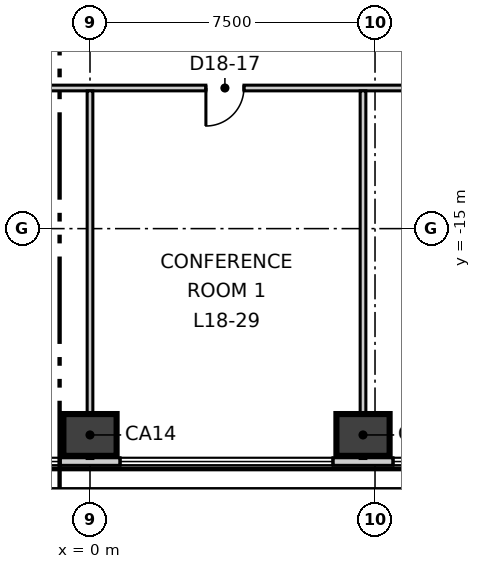
"""IFC4 building model, lengths in metres.
Left out: names, types, materials, properties, quantities, classifications, styles, units other than length and angle.
Written with IfcOpenShell. Run it as: python <this file> out.ifc"""

import sys

from ifc_helpers import new_model, si_unit, direction, frame, frame_2d, origin, origin_2d, place, context, subcontext, project, spatial, rectangle, extrude, element, fill, save


model = new_model("IFC4")
c1 = context("Model", 3, precision=1e-05, world=origin(), true_north=direction((0.0, 1.0)))
c2 = subcontext(c1, "Body", "Model", "MODEL_VIEW")
j1 = project(units=[si_unit("LENGTHUNIT", "METRE"), si_unit("PLANEANGLEUNIT", "RADIAN")], contexts=[c1])
p1 = place(None, origin())
s1 = spatial("IfcSite", under=j1, at=p1, CompositionType="ELEMENT")
p2 = place(p1, origin())
s2 = spatial("IfcBuilding", under=s1, at=p2, CompositionType="ELEMENT")
p3 = place(p2, frame((0.0, 0.0, 83.3)))
s3 = spatial("IfcBuildingStorey", under=s2, at=p3, CompositionType="ELEMENT", Elevation=83.3)
for number, where, z_axis, x_axis in (
    (1, (0.0, -20.429, -0.3), (0.0, 0.0, 1.0), (1.0, 0.0, 0.0)),
    (2, (7.184, -20.429, -0.3), (0.0, 0.0, 1.0), (1.0, 0.0, 0.0)),
):
    element("IfcColumn", number, at=place(p3, frame(where, z_axis=z_axis, x_axis=x_axis)), inside=s3, PredefinedType="COLUMN", context=c2, shape_type="SweptSolid", body=[
        extrude(rectangle(XDim=1.4, YDim=1.1, at=origin_2d()), origin(), (0.0, 0.0, 1.0), 4.0),
    ])
p4 = place(p3, frame((-30.037, -21.129, 0.0), z_axis=(0.0, 0.0, 1.0), x_axis=(1.0, 0.0, 0.0)))
e3 = element("IfcWall", 3, at=p4, inside=s3, PredefinedType="ELEMENTEDWALL", context=c2, shape_type="SweptSolid", body=[
    extrude(rectangle(XDim=60.054, YDim=0.2, at=frame_2d((30.027, 0.0))), origin(), (0.0, 0.0, 1.0), 3.7),
])
p5 = place(p4, frame((2.095, 0.0, 0.9)))
e4 = element("IfcOpeningElement", 4, at=p5, cuts=e3, PredefinedType="OPENING", context=c2, shape_type="SweptSolid", body=[
    extrude(rectangle(XDim=5.6, YDim=2.5, at=frame_2d((2.8, 1.25))), frame((0.0, 0.11, 0.0), z_axis=(0.0, -1.0, 0.0), x_axis=(1.0, 0.0, 0.0)), (0.0, 0.0, 1.0), 0.22),
])
p6 = place(p4, frame((9.278, 0.0, 0.9)))
e5 = element("IfcOpeningElement", 5, at=p6, cuts=e3, PredefinedType="OPENING", context=c2, shape_type="SweptSolid", body=[
    extrude(rectangle(XDim=5.6, YDim=2.5, at=frame_2d((2.8, 1.25))), frame((0.0, 0.11, 0.0), z_axis=(0.0, -1.0, 0.0), x_axis=(1.0, 0.0, 0.0)), (0.0, 0.0, 1.0), 0.22),
])
p7 = place(p4, frame((16.462, 0.0, 0.9)))
e6 = element("IfcOpeningElement", 6, at=p7, cuts=e3, PredefinedType="OPENING", context=c2, shape_type="SweptSolid", body=[
    extrude(rectangle(XDim=5.6, YDim=2.5, at=frame_2d((2.8, 1.25))), frame((0.0, 0.11, 0.0), z_axis=(0.0, -1.0, 0.0), x_axis=(1.0, 0.0, 0.0)), (0.0, 0.0, 1.0), 0.22),
])
p8 = place(p4, frame((23.645, 0.0, 0.9)))
e7 = element("IfcOpeningElement", 7, at=p8, cuts=e3, PredefinedType="OPENING", context=c2, shape_type="SweptSolid", body=[
    extrude(rectangle(XDim=5.6, YDim=2.5, at=frame_2d((2.8, 1.25))), frame((0.0, 0.11, 0.0), z_axis=(0.0, -1.0, 0.0), x_axis=(1.0, 0.0, 0.0)), (0.0, 0.0, 1.0), 0.22),
])
p9 = place(p4, frame((30.829, 0.0, 0.9)))
e8 = element("IfcOpeningElement", 8, at=p9, cuts=e3, PredefinedType="OPENING", context=c2, shape_type="SweptSolid", body=[
    extrude(rectangle(XDim=5.6, YDim=2.5, at=frame_2d((2.8, 1.25))), frame((0.0, 0.11, 0.0), z_axis=(0.0, -1.0, 0.0), x_axis=(1.0, 0.0, 0.0)), (0.0, 0.0, 1.0), 0.22),
])
p10 = place(p4, frame((38.012, 0.0, 0.9)))
e9 = element("IfcOpeningElement", 9, at=p10, cuts=e3, PredefinedType="OPENING", context=c2, shape_type="SweptSolid", body=[
    extrude(rectangle(XDim=5.6, YDim=2.5, at=frame_2d((2.8, 1.25))), frame((0.0, 0.11, 0.0), z_axis=(0.0, -1.0, 0.0), x_axis=(1.0, 0.0, 0.0)), (0.0, 0.0, 1.0), 0.22),
])
p11 = place(p4, frame((45.196, 0.0, 0.9)))
e10 = element("IfcOpeningElement", 10, at=p11, cuts=e3, PredefinedType="OPENING", context=c2, shape_type="SweptSolid", body=[
    extrude(rectangle(XDim=5.6, YDim=2.5, at=frame_2d((2.8, 1.25))), frame((0.0, 0.11, 0.0), z_axis=(0.0, -1.0, 0.0), x_axis=(1.0, 0.0, 0.0)), (0.0, 0.0, 1.0), 0.22),
])
p12 = place(p4, frame((52.379, 0.0, 0.9)))
e11 = element("IfcOpeningElement", 11, at=p12, cuts=e3, PredefinedType="OPENING", context=c2, shape_type="SweptSolid", body=[
    extrude(rectangle(XDim=5.6, YDim=2.5, at=frame_2d((2.8, 1.25))), frame((0.0, 0.11, 0.0), z_axis=(0.0, -1.0, 0.0), x_axis=(1.0, 0.0, 0.0)), (0.0, 0.0, 1.0), 0.22),
])
p13 = place(p3, frame((33.317, -15.448, 0.0), z_axis=(0.0, 0.0, 1.0), x_axis=(-0.499999874703, 0.866025476125, 0.0)))
e12 = element("IfcWall", 12, at=p13, inside=s3, PredefinedType="ELEMENTEDWALL", context=c2, shape_type="SweptSolid", body=[
    extrude(rectangle(XDim=60.054, YDim=0.2, at=frame_2d((30.027, 0.0))), origin(), (0.0, 0.0, 1.0), 3.7),
])
p14 = place(p13, frame((2.094, 0.0, 0.9)))
e13 = element("IfcOpeningElement", 13, at=p14, cuts=e12, PredefinedType="OPENING", context=c2, shape_type="SweptSolid", body=[
    extrude(rectangle(XDim=5.6, YDim=2.5, at=frame_2d((2.8, 1.25))), frame((0.0, 0.11, 0.0), z_axis=(0.0, -1.0, 0.0), x_axis=(1.0, 0.0, 0.0)), (0.0, 0.0, 1.0), 0.22),
])
p15 = place(p13, frame((9.278, 0.0, 0.9)))
e14 = element("IfcOpeningElement", 14, at=p15, cuts=e12, PredefinedType="OPENING", context=c2, shape_type="SweptSolid", body=[
    extrude(rectangle(XDim=5.6, YDim=2.5, at=frame_2d((2.8, 1.25))), frame((0.0, 0.11, 0.0), z_axis=(0.0, -1.0, 0.0), x_axis=(1.0, 0.0, 0.0)), (0.0, 0.0, 1.0), 0.22),
])
p16 = place(p13, frame((16.462, 0.0, 0.9)))
e15 = element("IfcOpeningElement", 15, at=p16, cuts=e12, PredefinedType="OPENING", context=c2, shape_type="SweptSolid", body=[
    extrude(rectangle(XDim=5.6, YDim=2.5, at=frame_2d((2.8, 1.25))), frame((0.0, 0.11, 0.0), z_axis=(0.0, -1.0, 0.0), x_axis=(1.0, 0.0, 0.0)), (0.0, 0.0, 1.0), 0.22),
])
p17 = place(p13, frame((23.645, 0.0, 0.9)))
e16 = element("IfcOpeningElement", 16, at=p17, cuts=e12, PredefinedType="OPENING", context=c2, shape_type="SweptSolid", body=[
    extrude(rectangle(XDim=5.6, YDim=2.5, at=frame_2d((2.8, 1.25))), frame((0.0, 0.11, 0.0), z_axis=(0.0, -1.0, 0.0), x_axis=(1.0, 0.0, 0.0)), (0.0, 0.0, 1.0), 0.22),
])
p18 = place(p13, frame((30.829, 0.0, 0.9)))
e17 = element("IfcOpeningElement", 17, at=p18, cuts=e12, PredefinedType="OPENING", context=c2, shape_type="SweptSolid", body=[
    extrude(rectangle(XDim=5.6, YDim=2.5, at=frame_2d((2.8, 1.25))), frame((0.0, 0.11, 0.0), z_axis=(0.0, -1.0, 0.0), x_axis=(1.0, 0.0, 0.0)), (0.0, 0.0, 1.0), 0.22),
])
p19 = place(p13, frame((38.012, 0.0, 0.9)))
e18 = element("IfcOpeningElement", 18, at=p19, cuts=e12, PredefinedType="OPENING", context=c2, shape_type="SweptSolid", body=[
    extrude(rectangle(XDim=5.6, YDim=2.5, at=frame_2d((2.8, 1.25))), frame((0.0, 0.11, 0.0), z_axis=(0.0, -1.0, 0.0), x_axis=(1.0, 0.0, 0.0)), (0.0, 0.0, 1.0), 0.22),
])
p20 = place(p13, frame((45.196, 0.0, 0.9)))
e19 = element("IfcOpeningElement", 19, at=p20, cuts=e12, PredefinedType="OPENING", context=c2, shape_type="SweptSolid", body=[
    extrude(rectangle(XDim=5.6, YDim=2.5, at=frame_2d((2.8, 1.25))), frame((0.0, 0.11, 0.0), z_axis=(0.0, -1.0, 0.0), x_axis=(1.0, 0.0, 0.0)), (0.0, 0.0, 1.0), 0.22),
])
p21 = place(p13, frame((52.379, 0.0, 0.9)))
e20 = element("IfcOpeningElement", 20, at=p21, cuts=e12, PredefinedType="OPENING", context=c2, shape_type="SweptSolid", body=[
    extrude(rectangle(XDim=5.6, YDim=2.5, at=frame_2d((2.8, 1.25))), frame((0.0, 0.11, 0.0), z_axis=(0.0, -1.0, 0.0), x_axis=(1.0, 0.0, 0.0)), (0.0, 0.0, 1.0), 0.22),
])
p22 = place(p3, frame((-19.497, -11.17, 0.0), z_axis=(0.0, 0.0, 1.0), x_axis=(0.499998854553, 0.866026065108, 0.0)))
e21 = element("IfcWall", 21, at=p22, inside=s3, PredefinedType="PARTITIONING", context=c2, shape_type="SweptSolid", body=[
    extrude(rectangle(XDim=38.994, YDim=0.15, at=frame_2d((19.497, 0.0))), origin(), (0.0, 0.0, 1.0), 3.7),
])
p23 = place(p22, frame((35.844, 0.0, 0.0)))
e22 = element("IfcOpeningElement", 22, at=p23, cuts=e21, PredefinedType="OPENING", context=c2, shape_type="SweptSolid", body=[
    extrude(rectangle(XDim=1.1, YDim=2.1, at=frame_2d((0.55, 1.05))), frame((0.0, 0.085, 0.0), z_axis=(0.0, -1.0, 0.0), x_axis=(1.0, 0.0, 0.0)), (0.0, 0.0, 1.0), 0.17),
])
p24 = place(p22, frame((26.04, 0.0, 0.0)))
e23 = element("IfcOpeningElement", 23, at=p24, cuts=e21, PredefinedType="OPENING", context=c2, shape_type="SweptSolid", body=[
    extrude(rectangle(XDim=1.1, YDim=2.1, at=frame_2d((0.55, 1.05))), frame((0.0, 0.085, 0.0), z_axis=(0.0, -1.0, 0.0), x_axis=(1.0, 0.0, 0.0)), (0.0, 0.0, 1.0), 0.17),
])
p25 = place(p22, frame((7.272, 0.0, 0.0)))
e24 = element("IfcOpeningElement", 24, at=p25, cuts=e21, PredefinedType="OPENING", context=c2, shape_type="SweptSolid", body=[
    extrude(rectangle(XDim=1.1, YDim=2.1, at=frame_2d((0.55, 1.05))), frame((0.0, 0.085, 0.0), z_axis=(0.0, -1.0, 0.0), x_axis=(1.0, 0.0, 0.0)), (0.0, 0.0, 1.0), 0.17),
])
p26 = place(p22, frame((17.372, 0.0, 0.0)))
e25 = element("IfcOpeningElement", 25, at=p26, cuts=e21, PredefinedType="OPENING", context=c2, shape_type="SweptSolid", body=[
    extrude(rectangle(XDim=0.9, YDim=2.1, at=frame_2d((0.45, 1.05))), frame((0.0, 0.085, 0.0), z_axis=(0.0, -1.0, 0.0), x_axis=(1.0, 0.0, 0.0)), (0.0, 0.0, 1.0), 0.17),
])
p27 = place(p22, frame((14.172, 0.0, 0.0)))
e26 = element("IfcOpeningElement", 26, at=p27, cuts=e21, PredefinedType="OPENING", context=c2, shape_type="SweptSolid", body=[
    extrude(rectangle(XDim=0.9, YDim=2.1, at=frame_2d((0.45, 1.05))), frame((0.0, 0.085, 0.0), z_axis=(0.0, -1.0, 0.0), x_axis=(1.0, 0.0, 0.0)), (0.0, 0.0, 1.0), 0.17),
])
p28 = place(p22, frame((11.272, 0.0, 0.0)))
e27 = element("IfcOpeningElement", 27, at=p28, cuts=e21, PredefinedType="OPENING", context=c2, shape_type="SweptSolid", body=[
    extrude(rectangle(XDim=1.0, YDim=2.1, at=frame_2d((0.5, 1.05))), frame((0.0, 0.085, 0.0), z_axis=(0.0, -1.0, 0.0), x_axis=(1.0, 0.0, 0.0)), (0.0, 0.0, 1.0), 0.17),
])
p29 = place(p22, frame((1.904, 0.0, 0.0)))
e28 = element("IfcOpeningElement", 28, at=p29, cuts=e21, PredefinedType="OPENING", context=c2, shape_type="SweptSolid", body=[
    extrude(rectangle(XDim=1.1, YDim=2.1, at=frame_2d((0.55, 1.05))), frame((0.0, 0.085, 0.0), z_axis=(0.0, -1.0, 0.0), x_axis=(1.0, 0.0, 0.0)), (0.0, 0.0, 1.0), 0.17),
])
p30 = place(p3, frame((-19.422, -11.3, 0.0), z_axis=(0.0, 0.0, 1.0), x_axis=(1.0, 0.0, 0.0)))
e29 = element("IfcWall", 29, at=p30, inside=s3, PredefinedType="PARTITIONING", context=c2, shape_type="SweptSolid", body=[
    extrude(rectangle(XDim=38.994, YDim=0.15, at=frame_2d((19.497, 0.0))), origin(), (0.0, 0.0, 1.0), 3.7),
])
p31 = place(p30, frame((1.9, 0.0, 0.0)))
e30 = element("IfcOpeningElement", 30, at=p31, cuts=e29, PredefinedType="OPENING", context=c2, shape_type="SweptSolid", body=[
    extrude(rectangle(XDim=1.1, YDim=2.1, at=frame_2d((0.55, 1.05))), frame((0.0, 0.085, 0.0), z_axis=(0.0, -1.0, 0.0), x_axis=(1.0, 0.0, 0.0)), (0.0, 0.0, 1.0), 0.17),
])
p32 = place(p30, frame((11.705, 0.0, 0.0)))
e31 = element("IfcOpeningElement", 31, at=p32, cuts=e29, PredefinedType="OPENING", context=c2, shape_type="SweptSolid", body=[
    extrude(rectangle(XDim=1.1, YDim=2.1, at=frame_2d((0.55, 1.05))), frame((0.0, 0.085, 0.0), z_axis=(0.0, -1.0, 0.0), x_axis=(1.0, 0.0, 0.0)), (0.0, 0.0, 1.0), 0.17),
])
p33 = place(p30, frame((6.405, 0.0, 0.0)))
e32 = element("IfcOpeningElement", 32, at=p33, cuts=e29, PredefinedType="OPENING", context=c2, shape_type="SweptSolid", body=[
    extrude(rectangle(XDim=0.9, YDim=2.1, at=frame_2d((0.45, 1.05))), frame((0.0, 0.085, 0.0), z_axis=(0.0, -1.0, 0.0), x_axis=(1.0, 0.0, 0.0)), (0.0, 0.0, 1.0), 0.17),
])
p34 = place(p30, frame((9.405, 0.0, 0.0)))
e33 = element("IfcOpeningElement", 33, at=p34, cuts=e29, PredefinedType="OPENING", context=c2, shape_type="SweptSolid", body=[
    extrude(rectangle(XDim=0.9, YDim=2.1, at=frame_2d((0.45, 1.05))), frame((0.0, 0.085, 0.0), z_axis=(0.0, -1.0, 0.0), x_axis=(1.0, 0.0, 0.0)), (0.0, 0.0, 1.0), 0.17),
])
p35 = place(p30, frame((22.472, 0.0, 0.0)))
e34 = element("IfcOpeningElement", 34, at=p35, cuts=e29, PredefinedType="OPENING", context=c2, shape_type="SweptSolid", body=[
    extrude(rectangle(XDim=1.0, YDim=2.1, at=frame_2d((0.5, 1.05))), frame((0.0, 0.085, 0.0), z_axis=(0.0, -1.0, 0.0), x_axis=(1.0, 0.0, 0.0)), (0.0, 0.0, 1.0), 0.17),
])
p36 = place(p30, frame((29.656, 0.0, 0.0)))
e35 = element("IfcOpeningElement", 35, at=p36, cuts=e29, PredefinedType="OPENING", context=c2, shape_type="SweptSolid", body=[
    extrude(rectangle(XDim=1.0, YDim=2.1, at=frame_2d((0.5, 1.05))), frame((0.0, 0.085, 0.0), z_axis=(0.0, -1.0, 0.0), x_axis=(1.0, 0.0, 0.0)), (0.0, 0.0, 1.0), 0.17),
])
p37 = place(p30, frame((35.839, 0.0, 0.0)))
e36 = element("IfcOpeningElement", 36, at=p37, cuts=e29, PredefinedType="OPENING", context=c2, shape_type="SweptSolid", body=[
    extrude(rectangle(XDim=1.1, YDim=2.1, at=frame_2d((0.55, 1.05))), frame((0.0, 0.085, 0.0), z_axis=(0.0, -1.0, 0.0), x_axis=(1.0, 0.0, 0.0)), (0.0, 0.0, 1.0), 0.17),
])
p38 = place(p3, frame((0.0, -21.049, 0.0), z_axis=(0.0, 0.0, 1.0), x_axis=(0.0, 1.0, 0.0)))
e37 = element("IfcWall", 37, at=p38, inside=s3, PredefinedType="PARTITIONING", context=c2, shape_type="SweptSolid", body=[
    extrude(rectangle(XDim=9.674, YDim=0.15, at=frame_2d((4.837, 0.0))), origin(), (0.0, 0.0, 1.0), 3.2),
])
p39 = place(p3, frame((0.075, 22.47, 0.0), z_axis=(0.0, 0.0, 1.0), x_axis=(0.500002280369, -0.866024087209, 0.0)))
e38 = element("IfcWall", 38, at=p39, inside=s3, PredefinedType="PARTITIONING", context=c2, shape_type="SweptSolid", body=[
    extrude(rectangle(XDim=38.844, YDim=0.15, at=frame_2d((19.422, 0.0))), origin(), (0.0, 0.0, 1.0), 3.7),
])
p40 = place(p39, frame((35.844, 0.0, 0.0)))
e39 = element("IfcOpeningElement", 39, at=p40, cuts=e38, PredefinedType="OPENING", context=c2, shape_type="SweptSolid", body=[
    extrude(rectangle(XDim=1.1, YDim=2.1, at=frame_2d((0.55, 1.05))), frame((0.0, 0.085, 0.0), z_axis=(0.0, -1.0, 0.0), x_axis=(1.0, 0.0, 0.0)), (0.0, 0.0, 1.0), 0.17),
])
p41 = place(p39, frame((14.44, 0.0, 0.0)))
e40 = element("IfcOpeningElement", 40, at=p41, cuts=e38, PredefinedType="OPENING", context=c2, shape_type="SweptSolid", body=[
    extrude(rectangle(XDim=1.1, YDim=2.1, at=frame_2d((0.55, 1.05))), frame((0.0, 0.085, 0.0), z_axis=(0.0, -1.0, 0.0), x_axis=(1.0, 0.0, 0.0)), (0.0, 0.0, 1.0), 0.17),
])
p42 = place(p39, frame((31.74, 0.0, 0.0)))
e41 = element("IfcOpeningElement", 41, at=p42, cuts=e38, PredefinedType="OPENING", context=c2, shape_type="SweptSolid", body=[
    extrude(rectangle(XDim=0.9, YDim=2.1, at=frame_2d((0.45, 1.05))), frame((0.0, 0.085, 0.0), z_axis=(0.0, -1.0, 0.0), x_axis=(1.0, 0.0, 0.0)), (0.0, 0.0, 1.0), 0.17),
])
p43 = place(p39, frame((28.54, 0.0, 0.0)))
e42 = element("IfcOpeningElement", 42, at=p43, cuts=e38, PredefinedType="OPENING", context=c2, shape_type="SweptSolid", body=[
    extrude(rectangle(XDim=0.9, YDim=2.1, at=frame_2d((0.45, 1.05))), frame((0.0, 0.085, 0.0), z_axis=(0.0, -1.0, 0.0), x_axis=(1.0, 0.0, 0.0)), (0.0, 0.0, 1.0), 0.17),
])
p44 = place(p39, frame((25.74, 0.0, 0.0)))
e43 = element("IfcOpeningElement", 43, at=p44, cuts=e38, PredefinedType="OPENING", context=c2, shape_type="SweptSolid", body=[
    extrude(rectangle(XDim=1.0, YDim=2.1, at=frame_2d((0.5, 1.05))), frame((0.0, 0.085, 0.0), z_axis=(0.0, -1.0, 0.0), x_axis=(1.0, 0.0, 0.0)), (0.0, 0.0, 1.0), 0.17),
])
p45 = place(p39, frame((1.905, 0.0, 0.0)))
e44 = element("IfcOpeningElement", 44, at=p45, cuts=e38, PredefinedType="OPENING", context=c2, shape_type="SweptSolid", body=[
    extrude(rectangle(XDim=1.1, YDim=2.1, at=frame_2d((0.55, 1.05))), frame((0.0, 0.085, 0.0), z_axis=(0.0, -1.0, 0.0), x_axis=(1.0, 0.0, 0.0)), (0.0, 0.0, 1.0), 0.17),
])
p46 = place(p3, frame((7.184, -21.049, 0.0), z_axis=(0.0, 0.0, 1.0), x_axis=(0.0, 1.0, 0.0)))
e45 = element("IfcWall", 45, at=p46, inside=s3, PredefinedType="PARTITIONING", context=c2, shape_type="SweptSolid", body=[
    extrude(rectangle(XDim=9.674, YDim=0.15, at=frame_2d((4.837, 0.0))), origin(), (0.0, 0.0, 1.0), 3.7),
])
p47 = place(p8, origin())
e46 = element("IfcWindow", 46, at=p47, inside=s3, PartitioningType="SINGLE_PANEL", PredefinedType="WINDOW", context=c2, shape_type="SweptSolid", body=[
    extrude(rectangle(XDim=5.6, YDim=2.5, at=frame_2d((2.8, 1.25))), frame((0.0, 0.03, 0.0), z_axis=(0.0, -1.0, 0.0), x_axis=(1.0, 0.0, 0.0)), (0.0, 0.0, 1.0), 0.06),
])
fill(e7, e46)
p48 = place(p9, origin())
e47 = element("IfcWindow", 47, at=p48, inside=s3, PartitioningType="SINGLE_PANEL", PredefinedType="WINDOW", context=c2, shape_type="SweptSolid", body=[
    extrude(rectangle(XDim=5.6, YDim=2.5, at=frame_2d((2.8, 1.25))), frame((0.0, 0.03, 0.0), z_axis=(0.0, -1.0, 0.0), x_axis=(1.0, 0.0, 0.0)), (0.0, 0.0, 1.0), 0.06),
])
fill(e8, e47)
p49 = place(p10, origin())
e48 = element("IfcWindow", 48, at=p49, inside=s3, PartitioningType="SINGLE_PANEL", PredefinedType="WINDOW", context=c2, shape_type="SweptSolid", body=[
    extrude(rectangle(XDim=5.6, YDim=2.5, at=frame_2d((2.8, 1.25))), frame((0.0, 0.03, 0.0), z_axis=(0.0, -1.0, 0.0), x_axis=(1.0, 0.0, 0.0)), (0.0, 0.0, 1.0), 0.06),
])
fill(e9, e48)
p50 = place(p35, origin())
e49 = element("IfcDoor", 49, at=p50, inside=s3, OperationType="SINGLE_SWING_LEFT", PredefinedType="DOOR", context=c2, shape_type="SweptSolid", body=[
    extrude(rectangle(XDim=1.0, YDim=2.1, at=frame_2d((0.5, 1.05))), frame((0.0, 0.025, 0.0), z_axis=(0.0, -1.0, 0.0), x_axis=(1.0, 0.0, 0.0)), (0.0, 0.0, 1.0), 0.05),
])
fill(e34, e49)
save(model, sys.argv[1])
